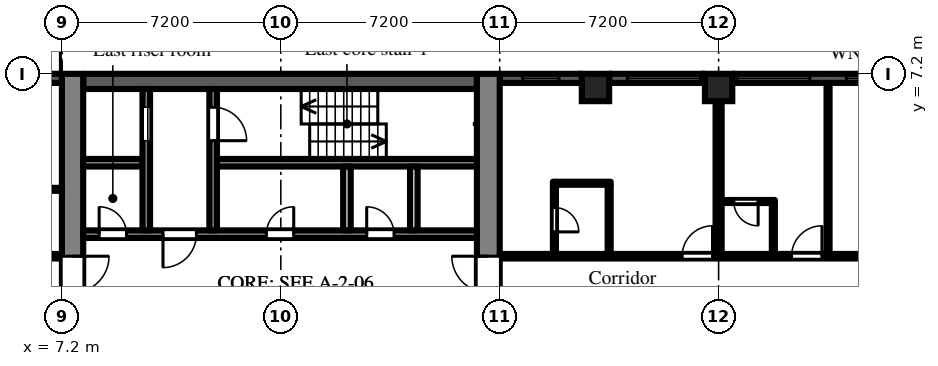
"""IFC4 building model, lengths in metres.
Left out: names, types, materials, properties, quantities, classifications, styles, units other than length and angle.
Written with IfcOpenShell. Run it as: python <this file> out.ifc"""

import sys

from ifc_helpers import new_model, si_unit, direction, frame, frame_2d, origin, origin_2d, place, context, subcontext, project, spatial, rectangle, extrude, element, fill, save


model = new_model("IFC4")
c1 = context("Model", 3, precision=1e-05, world=origin(), true_north=direction((0.0, 1.0)))
c2 = subcontext(c1, "Body", "Model", "MODEL_VIEW")
j1 = project(units=[si_unit("LENGTHUNIT", "METRE"), si_unit("PLANEANGLEUNIT", "RADIAN")], contexts=[c1])
p1 = place(None, origin())
s1 = spatial("IfcSite", under=j1, at=p1, CompositionType="ELEMENT")
p2 = place(p1, origin())
s2 = spatial("IfcBuilding", under=s1, at=p2, CompositionType="ELEMENT")
p3 = place(p2, frame((0.0, 0.0, 29.7)))
s3 = spatial("IfcBuildingStorey", under=s2, at=p3, CompositionType="ELEMENT", Elevation=29.7)
for number, where, z_axis, x_axis in (
    (1, (24.75, 6.75, 0.0), (0.0, 0.0, 1.0), (1.0, 0.0, 0.0)),
    (2, (28.8, 6.75, 0.0), (0.0, 0.0, 1.0), (1.0, 0.0, 0.0)),
):
    element("IfcColumn", number, at=place(p3, frame(where, z_axis=z_axis, x_axis=x_axis)), inside=s3, PredefinedType="COLUMN", context=c2, shape_type="SweptSolid", body=[
        extrude(rectangle(XDim=0.9, YDim=0.9, at=origin_2d()), origin(), (0.0, 0.0, 1.0), 3.0),
    ])
p4 = place(p3, frame((35.55, 7.05, 0.0), z_axis=(0.0, 0.0, 1.0), x_axis=(-1.0, 0.0, 0.0)))
e3 = element("IfcWall", 3, at=p4, inside=s3, PredefinedType="SOLIDWALL", context=c2, shape_type="SweptSolid", body=[
    extrude(rectangle(XDim=6.3, YDim=0.3, at=frame_2d((3.15, 0.0))), origin(), (0.0, 0.0, 1.0), 2.1),
])
p5 = place(p4, frame((0.15, 0.0, 0.2)))
e4 = element("IfcOpeningElement", 4, at=p5, cuts=e3, PredefinedType="OPENING", context=c2, shape_type="SweptSolid", body=[
    extrude(rectangle(XDim=2.4, YDim=1.85, at=frame_2d((1.2, 0.925))), frame((0.0, 0.16, 0.0), z_axis=(0.0, -1.0, 0.0), x_axis=(1.0, 0.0, 0.0)), (0.0, 0.0, 1.0), 0.32),
])
p6 = place(p4, frame((3.75, 0.0, 0.2)))
e5 = element("IfcOpeningElement", 5, at=p6, cuts=e3, PredefinedType="OPENING", context=c2, shape_type="SweptSolid", body=[
    extrude(rectangle(XDim=2.4, YDim=1.85, at=frame_2d((1.2, 0.925))), frame((0.0, 0.16, 0.0), z_axis=(0.0, -1.0, 0.0), x_axis=(1.0, 0.0, 0.0)), (0.0, 0.0, 1.0), 0.32),
])
p7 = place(p3, frame((28.35, 7.05, 0.0), z_axis=(0.0, 0.0, 1.0), x_axis=(-1.0, 0.0, 0.0)))
e6 = element("IfcWall", 6, at=p7, inside=s3, PredefinedType="SOLIDWALL", context=c2, shape_type="SweptSolid", body=[
    extrude(rectangle(XDim=3.15, YDim=0.3, at=frame_2d((1.575, 0.0))), origin(), (0.0, 0.0, 1.0), 2.1),
])
p8 = place(p7, frame((0.15, 0.0, 0.2)))
e7 = element("IfcOpeningElement", 7, at=p8, cuts=e6, PredefinedType="OPENING", context=c2, shape_type="SweptSolid", body=[
    extrude(rectangle(XDim=2.4, YDim=1.85, at=frame_2d((1.2, 0.925))), frame((0.0, 0.16, 0.0), z_axis=(0.0, -1.0, 0.0), x_axis=(1.0, 0.0, 0.0)), (0.0, 0.0, 1.0), 0.32),
])
p9 = place(p3, frame((24.3, 7.05, 0.0), z_axis=(0.0, 0.0, 1.0), x_axis=(-1.0, 0.0, 0.0)))
e8 = element("IfcWall", 8, at=p9, inside=s3, PredefinedType="SOLIDWALL", context=c2, shape_type="SweptSolid", body=[
    extrude(rectangle(XDim=2.7, YDim=0.3, at=frame_2d((1.35, 0.0))), origin(), (0.0, 0.0, 1.0), 2.1),
])
p10 = place(p9, frame((0.75, 0.0, 0.2)))
e9 = element("IfcOpeningElement", 9, at=p10, cuts=e8, PredefinedType="OPENING", context=c2, shape_type="SweptSolid", body=[
    extrude(rectangle(XDim=1.2, YDim=1.85, at=frame_2d((0.6, 0.925))), frame((0.0, 0.16, 0.0), z_axis=(0.0, -1.0, 0.0), x_axis=(1.0, 0.0, 0.0)), (0.0, 0.0, 1.0), 0.32),
])
p11 = place(p3, frame((7.2, 7.05, 0.0), z_axis=(0.0, 0.0, 1.0), x_axis=(-1.0, 0.0, 0.0)))
e10 = element("IfcWall", 10, at=p11, inside=s3, PredefinedType="SOLIDWALL", context=c2, shape_type="SweptSolid", body=[
    extrude(rectangle(XDim=3.0, YDim=0.3, at=frame_2d((1.5, 0.0))), origin(), (0.0, 0.0, 1.0), 2.1),
])
p12 = place(p3, frame((7.55, -7.2, 0.0), z_axis=(0.0, 0.0, 1.0), x_axis=(0.0, 1.0, 0.0)))
e11 = element("IfcWall", 11, at=p12, inside=s3, PredefinedType="SHEAR", context=c2, shape_type="SweptSolid", body=[
    extrude(rectangle(XDim=14.4, YDim=0.7, at=frame_2d((7.2, 0.0))), origin(), (0.0, 0.0, 1.0), 2.575),
])
p13 = place(p12, frame((6.0, 0.0, 0.0)))
e12 = element("IfcOpeningElement", 12, at=p13, cuts=e11, PredefinedType="OPENING", context=c2, shape_type="SweptSolid", body=[
    extrude(rectangle(XDim=2.4, YDim=2.2, at=frame_2d((1.2, 1.1))), frame((0.0, 0.36, 0.0), z_axis=(0.0, -1.0, 0.0), x_axis=(1.0, 0.0, 0.0)), (0.0, 0.0, 1.0), 0.72),
])
p14 = place(p3, frame((21.225, -7.2, 0.0), z_axis=(0.0, 0.0, 1.0), x_axis=(0.0, 1.0, 0.0)))
e13 = element("IfcWall", 13, at=p14, inside=s3, PredefinedType="SHEAR", context=c2, shape_type="SweptSolid", body=[
    extrude(rectangle(XDim=14.4, YDim=0.75, at=frame_2d((7.2, 0.0))), origin(), (0.0, 0.0, 1.0), 2.575),
])
p15 = place(p14, frame((6.0, 0.0, 0.0)))
e14 = element("IfcOpeningElement", 14, at=p15, cuts=e13, PredefinedType="OPENING", context=c2, shape_type="SweptSolid", body=[
    extrude(rectangle(XDim=2.4, YDim=2.2, at=frame_2d((1.2, 1.1))), frame((0.0, 0.385, 0.0), z_axis=(0.0, -1.0, 0.0), x_axis=(1.0, 0.0, 0.0)), (0.0, 0.0, 1.0), 0.77),
])
p16 = place(p3, frame((7.9, 6.95, 0.0), z_axis=(0.0, 0.0, 1.0), x_axis=(1.0, 0.0, 0.0)))
e15 = element("IfcWall", 15, at=p16, inside=s3, PredefinedType="SHEAR", context=c2, shape_type="SweptSolid", body=[
    extrude(rectangle(XDim=12.95, YDim=0.5, at=frame_2d((6.475, 0.0))), origin(), (0.0, 0.0, 1.0), 2.575),
])
p17 = place(p3, frame((7.9, 1.925, 0.0), z_axis=(0.0, 0.0, 1.0), x_axis=(1.0, 0.0, 0.0)))
e16 = element("IfcWall", 16, at=p17, inside=s3, PredefinedType="SHEAR", context=c2, shape_type="SweptSolid", body=[
    extrude(rectangle(XDim=12.95, YDim=0.25, at=frame_2d((6.475, 0.0))), origin(), (0.0, 0.0, 1.0), 2.575),
])
p18 = place(p17, frame((0.525, 0.0, 0.0)))
e17 = element("IfcOpeningElement", 17, at=p18, cuts=e16, PredefinedType="OPENING", context=c2, shape_type="SweptSolid", body=[
    extrude(rectangle(XDim=0.9, YDim=2.1, at=frame_2d((0.45, 1.05))), frame((0.0, 0.135, 0.0), z_axis=(0.0, -1.0, 0.0), x_axis=(1.0, 0.0, 0.0)), (0.0, 0.0, 1.0), 0.27),
])
p19 = place(p17, frame((2.625, 0.0, 0.0)))
e18 = element("IfcOpeningElement", 18, at=p19, cuts=e16, PredefinedType="OPENING", context=c2, shape_type="SweptSolid", body=[
    extrude(rectangle(XDim=1.1, YDim=2.1, at=frame_2d((0.55, 1.05))), frame((0.0, 0.135, 0.0), z_axis=(0.0, -1.0, 0.0), x_axis=(1.0, 0.0, 0.0)), (0.0, 0.0, 1.0), 0.27),
])
p20 = place(p17, frame((6.025, 0.0, 0.0)))
e19 = element("IfcOpeningElement", 19, at=p20, cuts=e16, PredefinedType="OPENING", context=c2, shape_type="SweptSolid", body=[
    extrude(rectangle(XDim=0.9, YDim=2.1, at=frame_2d((0.45, 1.05))), frame((0.0, 0.135, 0.0), z_axis=(0.0, -1.0, 0.0), x_axis=(1.0, 0.0, 0.0)), (0.0, 0.0, 1.0), 0.27),
])
p21 = place(p17, frame((9.325, 0.0, 0.0)))
e20 = element("IfcOpeningElement", 20, at=p21, cuts=e16, PredefinedType="OPENING", context=c2, shape_type="SweptSolid", body=[
    extrude(rectangle(XDim=0.9, YDim=2.1, at=frame_2d((0.45, 1.05))), frame((0.0, 0.135, 0.0), z_axis=(0.0, -1.0, 0.0), x_axis=(1.0, 0.0, 0.0)), (0.0, 0.0, 1.0), 0.27),
])
p22 = place(p3, frame((7.9, 4.275, 0.0), z_axis=(0.0, 0.0, 1.0), x_axis=(1.0, 0.0, 0.0)))
e21 = element("IfcWall", 21, at=p22, inside=s3, PredefinedType="SHEAR", context=c2, shape_type="SweptSolid", body=[
    extrude(rectangle(XDim=1.95, YDim=0.25, at=frame_2d((0.975, 0.0))), origin(), (0.0, 0.0, 1.0), 2.575),
])
p23 = place(p3, frame((12.3, 4.275, 0.0), z_axis=(0.0, 0.0, 1.0), x_axis=(1.0, 0.0, 0.0)))
e22 = element("IfcWall", 22, at=p23, inside=s3, PredefinedType="SHEAR", context=c2, shape_type="SweptSolid", body=[
    extrude(rectangle(XDim=8.55, YDim=0.25, at=frame_2d((4.275, 0.0))), origin(), (0.0, 0.0, 1.0), 2.575),
])
p24 = place(p3, frame((9.975, 2.05, 0.0), z_axis=(0.0, 0.0, 1.0), x_axis=(0.0, 1.0, 0.0)))
e23 = element("IfcWall", 23, at=p24, inside=s3, PredefinedType="SHEAR", context=c2, shape_type="SweptSolid", body=[
    extrude(rectangle(XDim=4.65, YDim=0.25, at=frame_2d((2.325, 0.0))), origin(), (0.0, 0.0, 1.0), 2.575),
])
p25 = place(p24, frame((2.95, 0.0, 0.0)))
e24 = element("IfcOpeningElement", 24, at=p25, cuts=e23, PredefinedType="OPENING", context=c2, shape_type="SweptSolid", body=[
    extrude(rectangle(XDim=1.1, YDim=2.1, at=frame_2d((0.55, 1.05))), frame((0.0, 0.135, 0.0), z_axis=(0.0, -1.0, 0.0), x_axis=(1.0, 0.0, 0.0)), (0.0, 0.0, 1.0), 0.27),
])
p26 = place(p3, frame((12.175, 2.05, 0.0), z_axis=(0.0, 0.0, 1.0), x_axis=(0.0, 1.0, 0.0)))
e25 = element("IfcWall", 25, at=p26, inside=s3, PredefinedType="SHEAR", context=c2, shape_type="SweptSolid", body=[
    extrude(rectangle(XDim=4.65, YDim=0.25, at=frame_2d((2.325, 0.0))), origin(), (0.0, 0.0, 1.0), 2.575),
])
p27 = place(p26, frame((2.95, 0.0, 0.0)))
e26 = element("IfcOpeningElement", 26, at=p27, cuts=e25, PredefinedType="OPENING", context=c2, shape_type="SweptSolid", body=[
    extrude(rectangle(XDim=1.1, YDim=2.1, at=frame_2d((0.55, 1.05))), frame((0.0, 0.135, 0.0), z_axis=(0.0, -1.0, 0.0), x_axis=(1.0, 0.0, 0.0)), (0.0, 0.0, 1.0), 0.27),
])
for number, where, z_axis, x_axis in (
    (27, (16.575, 2.05, 0.0), (0.0, 0.0, 1.0), (0.0, 1.0, 0.0)),
    (28, (18.775, 2.05, 0.0), (0.0, 0.0, 1.0), (0.0, 1.0, 0.0)),
):
    element("IfcWall", number, at=place(p3, frame(where, z_axis=z_axis, x_axis=x_axis)), inside=s3, PredefinedType="PARTITIONING", context=c2, shape_type="SweptSolid", body=[
        extrude(rectangle(XDim=2.1, YDim=0.25, at=frame_2d((1.05, 0.0))), origin(), (0.0, 0.0, 1.0), 2.575),
    ])
p28 = place(p3, frame((1.275, 1.2, 0.0), z_axis=(0.0, 0.0, 1.0), x_axis=(1.0, 0.0, 0.0)))
e29 = element("IfcWall", 29, at=p28, inside=s3, PredefinedType="PARTITIONING", context=c2, shape_type="SweptSolid", body=[
    extrude(rectangle(XDim=5.925, YDim=0.15, at=frame_2d((2.962, 0.0))), origin(), (0.0, 0.0, 1.0), 2.575),
])
p29 = place(p28, frame((2.475, 0.0, 0.0)))
e30 = element("IfcOpeningElement", 30, at=p29, cuts=e29, PredefinedType="OPENING", context=c2, shape_type="SweptSolid", body=[
    extrude(rectangle(XDim=0.9, YDim=2.1, at=frame_2d((0.45, 1.05))), frame((0.0, 0.085, 0.0), z_axis=(0.0, -1.0, 0.0), x_axis=(1.0, 0.0, 0.0)), (0.0, 0.0, 1.0), 0.17),
])
p30 = place(p3, frame((1.275, 3.4, 0.0), z_axis=(0.0, 0.0, 1.0), x_axis=(1.0, 0.0, 0.0)))
e31 = element("IfcWall", 31, at=p30, inside=s3, PredefinedType="PARTITIONING", context=c2, shape_type="SweptSolid", body=[
    extrude(rectangle(XDim=5.925, YDim=0.1, at=frame_2d((2.962, 0.0))), origin(), (0.0, 0.0, 1.0), 2.575),
])
p31 = place(p3, frame((21.6, 1.2, 0.0), z_axis=(0.0, 0.0, 1.0), x_axis=(1.0, 0.0, 0.0)))
e32 = element("IfcWall", 32, at=p31, inside=s3, PredefinedType="PARTITIONING", context=c2, shape_type="SweptSolid", body=[
    extrude(rectangle(XDim=14.9, YDim=0.15, at=frame_2d((7.45, 0.0))), origin(), (0.0, 0.0, 1.0), 2.575),
])
p32 = place(p31, frame((6.0, 0.0, 0.0)))
e33 = element("IfcOpeningElement", 33, at=p32, cuts=e32, PredefinedType="OPENING", context=c2, shape_type="SweptSolid", body=[
    extrude(rectangle(XDim=1.0, YDim=2.1, at=frame_2d((0.5, 1.05))), frame((0.0, 0.085, 0.0), z_axis=(0.0, -1.0, 0.0), x_axis=(1.0, 0.0, 0.0)), (0.0, 0.0, 1.0), 0.17),
])
p33 = place(p31, frame((9.6, 0.0, 0.0)))
e34 = element("IfcOpeningElement", 34, at=p33, cuts=e32, PredefinedType="OPENING", context=c2, shape_type="SweptSolid", body=[
    extrude(rectangle(XDim=1.0, YDim=2.1, at=frame_2d((0.5, 1.05))), frame((0.0, 0.085, 0.0), z_axis=(0.0, -1.0, 0.0), x_axis=(1.0, 0.0, 0.0)), (0.0, 0.0, 1.0), 0.17),
])
p34 = place(p31, frame((11.95, 0.0, 0.0)))
e35 = element("IfcOpeningElement", 35, at=p34, cuts=e32, PredefinedType="OPENING", context=c2, shape_type="SweptSolid", body=[
    extrude(rectangle(XDim=1.8, YDim=2.1, at=frame_2d((0.9, 1.05))), frame((0.0, 0.085, 0.0), z_axis=(0.0, -1.0, 0.0), x_axis=(1.0, 0.0, 0.0)), (0.0, 0.0, 1.0), 0.17),
])
p35 = place(p3, frame((23.4, 1.275, 0.0), z_axis=(0.0, 0.0, 1.0), x_axis=(0.0, 1.0, 0.0)))
e36 = element("IfcWall", 36, at=p35, inside=s3, PredefinedType="PARTITIONING", context=c2, shape_type="SweptSolid", body=[
    extrude(rectangle(XDim=2.375, YDim=0.1, at=frame_2d((1.188, 0.0))), origin(), (0.0, 0.0, 1.0), 2.575),
])
p36 = place(p35, frame((0.725, 0.0, 0.0)))
e37 = element("IfcOpeningElement", 37, at=p36, cuts=e36, PredefinedType="OPENING", context=c2, shape_type="SweptSolid", body=[
    extrude(rectangle(XDim=0.8, YDim=2.1, at=frame_2d((0.4, 1.05))), frame((0.0, 0.06, 0.0), z_axis=(0.0, -1.0, 0.0), x_axis=(1.0, 0.0, 0.0)), (0.0, 0.0, 1.0), 0.12),
])
p37 = place(p3, frame((23.45, 3.6, 0.0), z_axis=(0.0, 0.0, 1.0), x_axis=(1.0, 0.0, 0.0)))
e38 = element("IfcWall", 38, at=p37, inside=s3, PredefinedType="PARTITIONING", context=c2, shape_type="SweptSolid", body=[
    extrude(rectangle(XDim=1.8, YDim=0.1, at=frame_2d((0.9, 0.0))), origin(), (0.0, 0.0, 1.0), 2.575),
])
p38 = place(p3, frame((25.2, 1.275, 0.0), z_axis=(0.0, 0.0, 1.0), x_axis=(0.0, 1.0, 0.0)))
e39 = element("IfcWall", 39, at=p38, inside=s3, PredefinedType="PARTITIONING", context=c2, shape_type="SweptSolid", body=[
    extrude(rectangle(XDim=2.275, YDim=0.1, at=frame_2d((1.138, 0.0))), origin(), (0.0, 0.0, 1.0), 2.575),
])
p39 = place(p3, frame((28.8, 1.275, 0.0), z_axis=(0.0, 0.0, 1.0), x_axis=(0.0, 1.0, 0.0)))
e40 = element("IfcWall", 40, at=p39, inside=s3, PredefinedType="PARTITIONING", context=c2, shape_type="SweptSolid", body=[
    extrude(rectangle(XDim=5.625, YDim=0.2, at=frame_2d((2.812, 0.0))), origin(), (0.0, 0.0, 1.0), 2.575),
])
p40 = place(p3, frame((28.9, 3.0, 0.0), z_axis=(0.0, 0.0, 1.0), x_axis=(1.0, 0.0, 0.0)))
e41 = element("IfcWall", 41, at=p40, inside=s3, PredefinedType="PARTITIONING", context=c2, shape_type="SweptSolid", body=[
    extrude(rectangle(XDim=1.75, YDim=0.1, at=frame_2d((0.875, 0.0))), origin(), (0.0, 0.0, 1.0), 2.575),
])
p41 = place(p40, frame((0.4, 0.0, 0.0)))
e42 = element("IfcOpeningElement", 42, at=p41, cuts=e41, PredefinedType="OPENING", context=c2, shape_type="SweptSolid", body=[
    extrude(rectangle(XDim=0.8, YDim=2.1, at=frame_2d((0.4, 1.05))), frame((0.0, 0.06, 0.0), z_axis=(0.0, -1.0, 0.0), x_axis=(1.0, 0.0, 0.0)), (0.0, 0.0, 1.0), 0.12),
])
p42 = place(p3, frame((30.6, 1.275, 0.0), z_axis=(0.0, 0.0, 1.0), x_axis=(0.0, 1.0, 0.0)))
e43 = element("IfcWall", 43, at=p42, inside=s3, PredefinedType="PARTITIONING", context=c2, shape_type="SweptSolid", body=[
    extrude(rectangle(XDim=1.675, YDim=0.1, at=frame_2d((0.837, 0.0))), origin(), (0.0, 0.0, 1.0), 2.575),
])
p43 = place(p3, frame((32.4, 1.275, 0.0), z_axis=(0.0, 0.0, 1.0), x_axis=(0.0, 1.0, 0.0)))
e44 = element("IfcWall", 44, at=p43, inside=s3, PredefinedType="PARTITIONING", context=c2, shape_type="SweptSolid", body=[
    extrude(rectangle(XDim=5.625, YDim=0.1, at=frame_2d((2.812, 0.0))), origin(), (0.0, 0.0, 1.0), 2.575),
])
p44 = place(p5, origin())
e45 = element("IfcWindow", 45, at=p44, inside=s3, PartitioningType="SINGLE_PANEL", PredefinedType="WINDOW", context=c2, shape_type="SweptSolid", body=[
    extrude(rectangle(XDim=2.4, YDim=1.85, at=frame_2d((1.2, 0.925))), frame((0.0, 0.03, 0.0), z_axis=(0.0, -1.0, 0.0), x_axis=(1.0, 0.0, 0.0)), (0.0, 0.0, 1.0), 0.06),
])
fill(e4, e45)
p45 = place(p6, origin())
e46 = element("IfcWindow", 46, at=p45, inside=s3, PartitioningType="SINGLE_PANEL", PredefinedType="WINDOW", context=c2, shape_type="SweptSolid", body=[
    extrude(rectangle(XDim=2.4, YDim=1.85, at=frame_2d((1.2, 0.925))), frame((0.0, 0.03, 0.0), z_axis=(0.0, -1.0, 0.0), x_axis=(1.0, 0.0, 0.0)), (0.0, 0.0, 1.0), 0.06),
])
fill(e5, e46)
p46 = place(p8, origin())
e47 = element("IfcWindow", 47, at=p46, inside=s3, PartitioningType="SINGLE_PANEL", PredefinedType="WINDOW", context=c2, shape_type="SweptSolid", body=[
    extrude(rectangle(XDim=2.4, YDim=1.85, at=frame_2d((1.2, 0.925))), frame((0.0, 0.03, 0.0), z_axis=(0.0, -1.0, 0.0), x_axis=(1.0, 0.0, 0.0)), (0.0, 0.0, 1.0), 0.06),
])
fill(e7, e47)
p47 = place(p10, origin())
e48 = element("IfcWindow", 48, at=p47, inside=s3, PartitioningType="SINGLE_PANEL", PredefinedType="WINDOW", context=c2, shape_type="SweptSolid", body=[
    extrude(rectangle(XDim=1.2, YDim=1.85, at=frame_2d((0.6, 0.925))), frame((0.0, 0.03, 0.0), z_axis=(0.0, -1.0, 0.0), x_axis=(1.0, 0.0, 0.0)), (0.0, 0.0, 1.0), 0.06),
])
fill(e9, e48)
p48 = place(p25, origin())
e49 = element("IfcDoor", 49, at=p48, inside=s3, OperationType="SLIDING_TO_LEFT", PredefinedType="DOOR", context=c2, shape_type="SweptSolid", body=[
    extrude(rectangle(XDim=1.1, YDim=2.1, at=frame_2d((0.55, 1.05))), frame((0.0, 0.025, 0.0), z_axis=(0.0, -1.0, 0.0), x_axis=(1.0, 0.0, 0.0)), (0.0, 0.0, 1.0), 0.05),
])
fill(e24, e49)
p49 = place(p27, frame((1.1, 0.0, 0.0), z_axis=(0.0, 0.0, 1.0), x_axis=(-1.0, 0.0, 0.0)))
e50 = element("IfcDoor", 50, at=p49, inside=s3, OperationType="SINGLE_SWING_RIGHT", PredefinedType="DOOR", context=c2, shape_type="SweptSolid", body=[
    extrude(rectangle(XDim=1.1, YDim=2.1, at=frame_2d((0.55, 1.05))), frame((0.0, 0.025, 0.0), z_axis=(0.0, -1.0, 0.0), x_axis=(1.0, 0.0, 0.0)), (0.0, 0.0, 1.0), 0.05),
])
fill(e26, e50)
p50 = place(p18, origin())
e51 = element("IfcDoor", 51, at=p50, inside=s3, OperationType="SINGLE_SWING_LEFT", PredefinedType="DOOR", context=c2, shape_type="SweptSolid", body=[
    extrude(rectangle(XDim=0.9, YDim=2.1, at=frame_2d((0.45, 1.05))), frame((0.0, 0.025, 0.0), z_axis=(0.0, -1.0, 0.0), x_axis=(1.0, 0.0, 0.0)), (0.0, 0.0, 1.0), 0.05),
])
fill(e17, e51)
p51 = place(p19, frame((1.1, 0.0, 0.0), z_axis=(0.0, 0.0, 1.0), x_axis=(-1.0, 0.0, 0.0)))
e52 = element("IfcDoor", 52, at=p51, inside=s3, OperationType="SINGLE_SWING_RIGHT", PredefinedType="DOOR", context=c2, shape_type="SweptSolid", body=[
    extrude(rectangle(XDim=1.1, YDim=2.1, at=frame_2d((0.55, 1.05))), frame((0.0, 0.025, 0.0), z_axis=(0.0, -1.0, 0.0), x_axis=(1.0, 0.0, 0.0)), (0.0, 0.0, 1.0), 0.05),
])
fill(e18, e52)
p52 = place(p13, frame((2.4, 0.0, 0.0), z_axis=(0.0, 0.0, 1.0), x_axis=(-1.0, 0.0, 0.0)))
e53 = element("IfcDoor", 53, at=p52, inside=s3, OperationType="DOUBLE_DOOR_DOUBLE_SWING", PredefinedType="DOOR", context=c2, shape_type="SweptSolid", body=[
    extrude(rectangle(XDim=2.4, YDim=2.2, at=frame_2d((1.2, 1.1))), frame((0.0, 0.025, 0.0), z_axis=(0.0, -1.0, 0.0), x_axis=(1.0, 0.0, 0.0)), (0.0, 0.0, 1.0), 0.05),
])
fill(e12, e53)
p53 = place(p15, origin())
e54 = element("IfcDoor", 54, at=p53, inside=s3, OperationType="DOUBLE_DOOR_DOUBLE_SWING", PredefinedType="DOOR", context=c2, shape_type="SweptSolid", body=[
    extrude(rectangle(XDim=2.4, YDim=2.2, at=frame_2d((1.2, 1.1))), frame((0.0, 0.025, 0.0), z_axis=(0.0, -1.0, 0.0), x_axis=(1.0, 0.0, 0.0)), (0.0, 0.0, 1.0), 0.05),
])
fill(e14, e54)
p54 = place(p20, origin())
e55 = element("IfcDoor", 55, at=p54, inside=s3, OperationType="SINGLE_SWING_RIGHT", PredefinedType="DOOR", context=c2, shape_type="SweptSolid", body=[
    extrude(rectangle(XDim=0.9, YDim=2.1, at=frame_2d((0.45, 1.05))), frame((0.0, 0.025, 0.0), z_axis=(0.0, -1.0, 0.0), x_axis=(1.0, 0.0, 0.0)), (0.0, 0.0, 1.0), 0.05),
])
fill(e19, e55)
p55 = place(p21, origin())
e56 = element("IfcDoor", 56, at=p55, inside=s3, OperationType="SINGLE_SWING_LEFT", PredefinedType="DOOR", context=c2, shape_type="SweptSolid", body=[
    extrude(rectangle(XDim=0.9, YDim=2.1, at=frame_2d((0.45, 1.05))), frame((0.0, 0.025, 0.0), z_axis=(0.0, -1.0, 0.0), x_axis=(1.0, 0.0, 0.0)), (0.0, 0.0, 1.0), 0.05),
])
fill(e20, e56)
p56 = place(p36, frame((0.8, 0.0, 0.0), z_axis=(0.0, 0.0, 1.0), x_axis=(-1.0, 0.0, 0.0)))
e57 = element("IfcDoor", 57, at=p56, inside=s3, OperationType="SINGLE_SWING_RIGHT", PredefinedType="DOOR", context=c2, shape_type="SweptSolid", body=[
    extrude(rectangle(XDim=0.8, YDim=2.1, at=frame_2d((0.4, 1.05))), frame((0.0, 0.025, 0.0), z_axis=(0.0, -1.0, 0.0), x_axis=(1.0, 0.0, 0.0)), (0.0, 0.0, 1.0), 0.05),
])
fill(e37, e57)
p57 = place(p32, origin())
e58 = element("IfcDoor", 58, at=p57, inside=s3, OperationType="SINGLE_SWING_RIGHT", PredefinedType="DOOR", context=c2, shape_type="SweptSolid", body=[
    extrude(rectangle(XDim=1.0, YDim=2.1, at=frame_2d((0.5, 1.05))), frame((0.0, 0.025, 0.0), z_axis=(0.0, -1.0, 0.0), x_axis=(1.0, 0.0, 0.0)), (0.0, 0.0, 1.0), 0.05),
])
fill(e33, e58)
p58 = place(p41, frame((0.8, 0.0, 0.0), z_axis=(0.0, 0.0, 1.0), x_axis=(-1.0, 0.0, 0.0)))
e59 = element("IfcDoor", 59, at=p58, inside=s3, OperationType="SINGLE_SWING_LEFT", PredefinedType="DOOR", context=c2, shape_type="SweptSolid", body=[
    extrude(rectangle(XDim=0.8, YDim=2.1, at=frame_2d((0.4, 1.05))), frame((0.0, 0.025, 0.0), z_axis=(0.0, -1.0, 0.0), x_axis=(1.0, 0.0, 0.0)), (0.0, 0.0, 1.0), 0.05),
])
fill(e42, e59)
p59 = place(p33, origin())
e60 = element("IfcDoor", 60, at=p59, inside=s3, OperationType="SINGLE_SWING_RIGHT", PredefinedType="DOOR", context=c2, shape_type="SweptSolid", body=[
    extrude(rectangle(XDim=1.0, YDim=2.1, at=frame_2d((0.5, 1.05))), frame((0.0, 0.025, 0.0), z_axis=(0.0, -1.0, 0.0), x_axis=(1.0, 0.0, 0.0)), (0.0, 0.0, 1.0), 0.05),
])
fill(e34, e60)
save(model, sys.argv[1])
